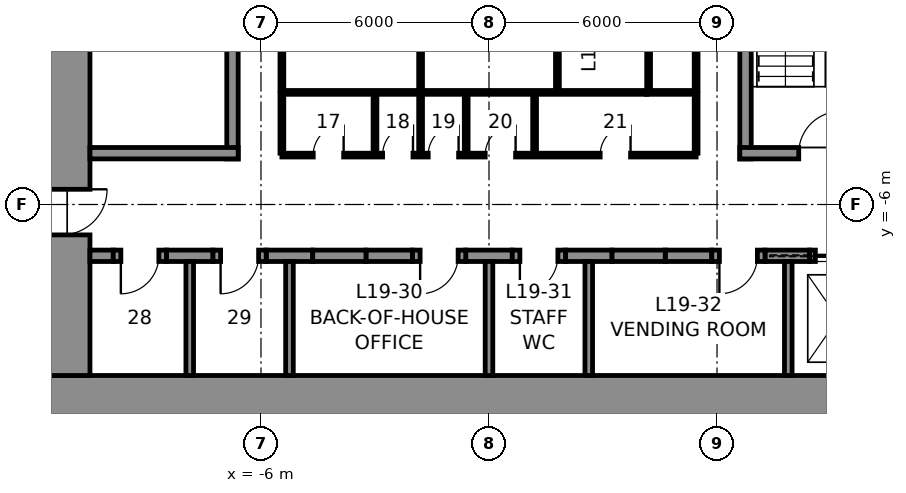
"""IFC4 building model, lengths in metres.
Left out: names, types, materials, properties, quantities, classifications, styles, units other than length and angle.
Written with IfcOpenShell. Run it as: python <this file> out.ifc"""

import sys

from ifc_helpers import new_model, si_unit, direction, frame, frame_2d, origin, place, context, subcontext, project, spatial, rectangle, extrude, element, fill, save


model = new_model("IFC4")
c1 = context("Model", 3, precision=1e-05, world=origin(), true_north=direction((0.0, 1.0)))
c2 = subcontext(c1, "Body", "Model", "MODEL_VIEW")
j1 = project(units=[si_unit("LENGTHUNIT", "METRE"), si_unit("PLANEANGLEUNIT", "RADIAN")], contexts=[c1])
p1 = place(None, origin())
s1 = spatial("IfcSite", under=j1, at=p1, CompositionType="ELEMENT")
p2 = place(p1, origin())
s2 = spatial("IfcBuilding", under=s1, at=p2, CompositionType="ELEMENT")
p3 = place(p2, frame((0.0, 0.0, 99.8)))
s3 = spatial("IfcBuildingStorey", under=s2, at=p3, CompositionType="ELEMENT", Elevation=99.8)
p4 = place(p3, frame((12.0, -11.25, 0.0), z_axis=(0.0, 0.0, 1.0), x_axis=(-1.0, 0.0, 0.0)))
e1 = element("IfcWall", 1, at=p4, inside=s3, PredefinedType="SHEAR", context=c2, shape_type="SweptSolid", body=[
    extrude(rectangle(XDim=24.0, YDim=1.5, at=frame_2d((12.0, 0.0))), origin(), (0.0, 0.0, 1.0), 4.6),
])
p5 = place(p3, frame((-11.25, -10.5, 0.0), z_axis=(0.0, 0.0, 1.0), x_axis=(0.0, 1.0, 0.0)))
e2 = element("IfcWall", 2, at=p5, inside=s3, PredefinedType="SHEAR", context=c2, shape_type="SweptSolid", body=[
    extrude(rectangle(XDim=21.0, YDim=1.5, at=frame_2d((10.5, 0.0))), origin(), (0.0, 0.0, 1.0), 4.6),
])
p6 = place(p5, frame((16.1, 0.0, 0.0)))
e3 = element("IfcOpeningElement", 3, at=p6, cuts=e2, PredefinedType="OPENING", context=c2, shape_type="SweptSolid", body=[
    extrude(rectangle(XDim=1.2, YDim=2.3, at=frame_2d((0.6, 1.15))), frame((0.0, 0.76, 0.0), z_axis=(0.0, -1.0, 0.0), x_axis=(1.0, 0.0, 0.0)), (0.0, 0.0, 1.0), 1.52),
])
p7 = place(p5, frame((3.7, 0.0, 0.0)))
e4 = element("IfcOpeningElement", 4, at=p7, cuts=e2, PredefinedType="OPENING", context=c2, shape_type="SweptSolid", body=[
    extrude(rectangle(XDim=1.2, YDim=2.3, at=frame_2d((0.6, 1.15))), frame((0.0, 0.76, 0.0), z_axis=(0.0, -1.0, 0.0), x_axis=(1.0, 0.0, 0.0)), (0.0, 0.0, 1.0), 1.52),
])
p8 = place(p3, frame((-10.5, -7.35, 0.0), z_axis=(0.0, 0.0, 1.0), x_axis=(1.0, 0.0, 0.0)))
e5 = element("IfcWall", 5, at=p8, inside=s3, PredefinedType="SHEAR", context=c2, shape_type="SweptSolid", body=[
    extrude(rectangle(XDim=0.613, YDim=0.3, at=frame_2d((0.306, 0.0))), origin(), (0.0, 0.0, 1.0), 4.6),
])
for number, where, z_axis, x_axis in (
    (6, (-8.488, -7.35, 0.0), (0.0, 0.0, 1.0), (1.0, 0.0, 0.0)),
    (7, (-5.863, -7.35, 0.0), (0.0, 0.0, 1.0), (1.0, 0.0, 0.0)),
    (8, (-3.238, -7.35, 0.0), (0.0, 0.0, 1.0), (1.0, 0.0, 0.0)),
    (9, (-0.613, -7.35, 0.0), (0.0, 0.0, 1.0), (1.0, 0.0, 0.0)),
    (10, (2.012, -7.35, 0.0), (0.0, 0.0, 1.0), (1.0, 0.0, 0.0)),
    (11, (4.637, -7.35, 0.0), (0.0, 0.0, 1.0), (1.0, 0.0, 0.0)),
):
    element("IfcWall", number, at=place(p3, frame(where, z_axis=z_axis, x_axis=x_axis)), inside=s3, PredefinedType="SHEAR", context=c2, shape_type="SweptSolid", body=[
        extrude(rectangle(XDim=1.225, YDim=0.3, at=frame_2d((0.613, 0.0))), origin(), (0.0, 0.0, 1.0), 4.6),
    ])
p9 = place(p3, frame((7.262, -7.35, 0.0), z_axis=(0.0, 0.0, 1.0), x_axis=(1.0, 0.0, 0.0)))
e12 = element("IfcWall", 12, at=p9, inside=s3, PredefinedType="SHEAR", context=c2, shape_type="SweptSolid", body=[
    extrude(rectangle(XDim=1.175, YDim=0.3, at=frame_2d((0.587, 0.0))), origin(), (0.0, 0.0, 1.0), 4.6),
])
p10 = place(p3, frame((-9.887, -7.35, 0.0), z_axis=(0.0, 0.0, 1.0), x_axis=(1.0, 0.0, 0.0)))
e13 = element("IfcWall", 13, at=p10, inside=s3, PredefinedType="PARTITIONING", context=c2, shape_type="SweptSolid", body=[
    extrude(rectangle(XDim=1.4, YDim=0.3, at=frame_2d((0.7, 0.0))), origin(), (0.0, 0.0, 1.0), 4.6),
])
p11 = place(p10, frame((0.2, 0.0, 0.0)))
e14 = element("IfcOpeningElement", 14, at=p11, cuts=e13, PredefinedType="OPENING", context=c2, shape_type="SweptSolid", body=[
    extrude(rectangle(XDim=1.0, YDim=2.3, at=frame_2d((0.5, 1.15))), frame((0.0, 0.16, 0.0), z_axis=(0.0, -1.0, 0.0), x_axis=(1.0, 0.0, 0.0)), (0.0, 0.0, 1.0), 0.32),
])
p12 = place(p3, frame((-7.262, -7.35, 0.0), z_axis=(0.0, 0.0, 1.0), x_axis=(1.0, 0.0, 0.0)))
e15 = element("IfcWall", 15, at=p12, inside=s3, PredefinedType="PARTITIONING", context=c2, shape_type="SweptSolid", body=[
    extrude(rectangle(XDim=1.4, YDim=0.3, at=frame_2d((0.7, 0.0))), origin(), (0.0, 0.0, 1.0), 4.6),
])
p13 = place(p12, frame((0.2, 0.0, 0.0)))
e16 = element("IfcOpeningElement", 16, at=p13, cuts=e15, PredefinedType="OPENING", context=c2, shape_type="SweptSolid", body=[
    extrude(rectangle(XDim=1.0, YDim=2.3, at=frame_2d((0.5, 1.15))), frame((0.0, 0.16, 0.0), z_axis=(0.0, -1.0, 0.0), x_axis=(1.0, 0.0, 0.0)), (0.0, 0.0, 1.0), 0.32),
])
p14 = place(p3, frame((-4.637, -7.35, 0.0), z_axis=(0.0, 0.0, 1.0), x_axis=(1.0, 0.0, 0.0)))
e17 = element("IfcWall", 17, at=p14, inside=s3, PredefinedType="PARTITIONING", context=c2, shape_type="SweptSolid", body=[
    extrude(rectangle(XDim=1.4, YDim=0.3, at=frame_2d((0.7, 0.0))), origin(), (0.0, 0.0, 1.0), 4.6),
])
p15 = place(p3, frame((-2.012, -7.35, 0.0), z_axis=(0.0, 0.0, 1.0), x_axis=(1.0, 0.0, 0.0)))
e18 = element("IfcWall", 18, at=p15, inside=s3, PredefinedType="PARTITIONING", context=c2, shape_type="SweptSolid", body=[
    extrude(rectangle(XDim=1.4, YDim=0.3, at=frame_2d((0.7, 0.0))), origin(), (0.0, 0.0, 1.0), 4.6),
])
p16 = place(p15, frame((0.2, 0.0, 0.0)))
e19 = element("IfcOpeningElement", 19, at=p16, cuts=e18, PredefinedType="OPENING", context=c2, shape_type="SweptSolid", body=[
    extrude(rectangle(XDim=1.0, YDim=2.3, at=frame_2d((0.5, 1.15))), frame((0.0, 0.16, 0.0), z_axis=(0.0, -1.0, 0.0), x_axis=(1.0, 0.0, 0.0)), (0.0, 0.0, 1.0), 0.32),
])
p17 = place(p3, frame((0.613, -7.35, 0.0), z_axis=(0.0, 0.0, 1.0), x_axis=(1.0, 0.0, 0.0)))
e20 = element("IfcWall", 20, at=p17, inside=s3, PredefinedType="PARTITIONING", context=c2, shape_type="SweptSolid", body=[
    extrude(rectangle(XDim=1.4, YDim=0.3, at=frame_2d((0.7, 0.0))), origin(), (0.0, 0.0, 1.0), 4.6),
])
p18 = place(p17, frame((0.2, 0.0, 0.0)))
e21 = element("IfcOpeningElement", 21, at=p18, cuts=e20, PredefinedType="OPENING", context=c2, shape_type="SweptSolid", body=[
    extrude(rectangle(XDim=1.0, YDim=2.3, at=frame_2d((0.5, 1.15))), frame((0.0, 0.16, 0.0), z_axis=(0.0, -1.0, 0.0), x_axis=(1.0, 0.0, 0.0)), (0.0, 0.0, 1.0), 0.32),
])
p19 = place(p3, frame((3.238, -7.35, 0.0), z_axis=(0.0, 0.0, 1.0), x_axis=(1.0, 0.0, 0.0)))
e22 = element("IfcWall", 22, at=p19, inside=s3, PredefinedType="PARTITIONING", context=c2, shape_type="SweptSolid", body=[
    extrude(rectangle(XDim=1.4, YDim=0.3, at=frame_2d((0.7, 0.0))), origin(), (0.0, 0.0, 1.0), 4.6),
])
p20 = place(p3, frame((5.863, -7.35, 0.0), z_axis=(0.0, 0.0, 1.0), x_axis=(1.0, 0.0, 0.0)))
e23 = element("IfcWall", 23, at=p20, inside=s3, PredefinedType="PARTITIONING", context=c2, shape_type="SweptSolid", body=[
    extrude(rectangle(XDim=1.4, YDim=0.3, at=frame_2d((0.7, 0.0))), origin(), (0.0, 0.0, 1.0), 4.6),
])
p21 = place(p20, frame((0.2, 0.0, 0.0)))
e24 = element("IfcOpeningElement", 24, at=p21, cuts=e23, PredefinedType="OPENING", context=c2, shape_type="SweptSolid", body=[
    extrude(rectangle(XDim=1.0, YDim=2.3, at=frame_2d((0.5, 1.15))), frame((0.0, 0.16, 0.0), z_axis=(0.0, -1.0, 0.0), x_axis=(1.0, 0.0, 0.0)), (0.0, 0.0, 1.0), 0.32),
])
p22 = place(p3, frame((8.438, -7.35, 0.0), z_axis=(0.0, 0.0, 1.0), x_axis=(1.0, 0.0, 0.0)))
e25 = element("IfcWall", 25, at=p22, inside=s3, PredefinedType="PARTITIONING", context=c2, shape_type="SweptSolid", body=[
    extrude(rectangle(XDim=1.5, YDim=0.3, at=frame_2d((0.75, 0.0))), origin(), (0.0, 0.0, 1.0), 4.6),
])
p23 = place(p22, frame((0.15, 0.0, 0.0)))
e26 = element("IfcOpeningElement", 26, at=p23, cuts=e25, PredefinedType="OPENING", context=c2, shape_type="SweptSolid", body=[
    extrude(rectangle(XDim=1.2, YDim=2.3, at=frame_2d((0.6, 1.15))), frame((0.0, 0.16, 0.0), z_axis=(0.0, -1.0, 0.0), x_axis=(1.0, 0.0, 0.0)), (0.0, 0.0, 1.0), 0.32),
])
for number, where, z_axis, x_axis in (
    (27, (-7.875, -10.5, 0.0), (0.0, 0.0, 1.0), (0.0, 1.0, 0.0)),
    (28, (-5.25, -10.5, 0.0), (0.0, 0.0, 1.0), (0.0, 1.0, 0.0)),
    (29, (0.0, -10.5, 0.0), (0.0, 0.0, 1.0), (0.0, 1.0, 0.0)),
    (30, (2.625, -10.5, 0.0), (0.0, 0.0, 1.0), (0.0, 1.0, 0.0)),
    (31, (7.875, -10.5, 0.0), (0.0, 0.0, 1.0), (0.0, 1.0, 0.0)),
):
    element("IfcWall", number, at=place(p3, frame(where, z_axis=z_axis, x_axis=x_axis)), inside=s3, PredefinedType="PARTITIONING", context=c2, shape_type="SweptSolid", body=[
        extrude(rectangle(XDim=3.0, YDim=0.2, at=frame_2d((1.5, 0.0))), origin(), (0.0, 0.0, 1.0), 4.6),
    ])
p24 = place(p3, frame((-6.75, -4.8, 0.0), z_axis=(0.0, 0.0, 1.0), x_axis=(0.0, 1.0, 0.0)))
e32 = element("IfcWall", 32, at=p24, inside=s3, PredefinedType="SOLIDWALL", context=c2, shape_type="SweptSolid", body=[
    extrude(rectangle(XDim=9.6, YDim=0.3, at=frame_2d((4.8, 0.0))), origin(), (0.0, 0.0, 1.0), 4.35),
])
p25 = place(p3, frame((-6.6, -4.65, 0.0), z_axis=(0.0, 0.0, 1.0), x_axis=(-1.0, 0.0, 0.0)))
e33 = element("IfcWall", 33, at=p25, inside=s3, PredefinedType="SOLIDWALL", context=c2, shape_type="SweptSolid", body=[
    extrude(rectangle(XDim=3.9, YDim=0.3, at=frame_2d((1.95, 0.0))), origin(), (0.0, 0.0, 1.0), 4.35),
])
p26 = place(p3, frame((6.75, -4.8, 0.0), z_axis=(0.0, 0.0, 1.0), x_axis=(0.0, 1.0, 0.0)))
e34 = element("IfcWall", 34, at=p26, inside=s3, PredefinedType="SOLIDWALL", context=c2, shape_type="SweptSolid", body=[
    extrude(rectangle(XDim=9.6, YDim=0.3, at=frame_2d((4.8, 0.0))), origin(), (0.0, 0.0, 1.0), 4.35),
])
p27 = place(p3, frame((10.5, -4.65, 0.0), z_axis=(0.0, 0.0, 1.0), x_axis=(-1.0, 0.0, 0.0)))
e35 = element("IfcWall", 35, at=p27, inside=s3, PredefinedType="SOLIDWALL", context=c2, shape_type="SweptSolid", body=[
    extrude(rectangle(XDim=3.9, YDim=0.3, at=frame_2d((1.95, 0.0))), origin(), (0.0, 0.0, 1.0), 4.35),
])
p28 = place(p27, frame((1.25, 0.0, 0.0)))
e36 = element("IfcOpeningElement", 36, at=p28, cuts=e35, PredefinedType="OPENING", context=c2, shape_type="SweptSolid", body=[
    extrude(rectangle(XDim=1.1, YDim=2.3, at=frame_2d((0.55, 1.15))), frame((0.0, 0.16, 0.0), z_axis=(0.0, -1.0, 0.0), x_axis=(1.0, 0.0, 0.0)), (0.0, 0.0, 1.0), 0.32),
])
p29 = place(p3, frame((4.15, -3.05, 0.0), z_axis=(0.0, 0.0, 1.0), x_axis=(-1.0, 0.0, 0.0)))
e37 = element("IfcWall", 37, at=p29, inside=s3, PredefinedType="PARTITIONING", context=c2, shape_type="SweptSolid", body=[
    extrude(rectangle(XDim=9.6, YDim=0.1, at=frame_2d((4.8, 0.0))), origin(), (0.0, 0.0, 1.0), 4.35),
])
p30 = place(p3, frame((5.45, -3.05, 0.0), z_axis=(0.0, 0.0, 1.0), x_axis=(-1.0, 0.0, 0.0)))
e38 = element("IfcWall", 38, at=p30, inside=s3, PredefinedType="PARTITIONING", context=c2, shape_type="SweptSolid", body=[
    extrude(rectangle(XDim=1.3, YDim=0.1, at=frame_2d((0.65, 0.0))), origin(), (0.0, 0.0, 1.0), 4.35),
])
for number, where, z_axis, x_axis in (
    (39, (5.45, 3.0, 0.0), (0.0, 0.0, 1.0), (0.0, -1.0, 0.0)),
    (40, (-5.45, -3.0, 0.0), (0.0, 0.0, 1.0), (0.0, 1.0, 0.0)),
    (41, (-1.8, -3.0, 0.0), (0.0, 0.0, 1.0), (0.0, 1.0, 0.0)),
    (42, (1.8, -3.0, 0.0), (0.0, 0.0, 1.0), (0.0, 1.0, 0.0)),
    (43, (4.2, -3.0, 0.0), (0.0, 0.0, 1.0), (0.0, 1.0, 0.0)),
):
    element("IfcWall", number, at=place(p3, frame(where, z_axis=z_axis, x_axis=x_axis)), inside=s3, PredefinedType="PARTITIONING", context=c2, shape_type="SweptSolid", body=[
        extrude(rectangle(XDim=6.0, YDim=0.1, at=frame_2d((3.0, 0.0))), origin(), (0.0, 0.0, 1.0), 4.35),
    ])
p31 = place(p3, frame((5.45, -4.7, 0.0), z_axis=(0.0, 0.0, 1.0), x_axis=(-1.0, 0.0, 0.0)))
e44 = element("IfcWall", 44, at=p31, inside=s3, PredefinedType="PARTITIONING", context=c2, shape_type="SweptSolid", body=[
    extrude(rectangle(XDim=10.9, YDim=0.1, at=frame_2d((5.45, 0.0))), origin(), (0.0, 0.0, 1.0), 4.35),
])
p32 = place(p31, frame((9.275, 0.0, 0.0)))
e45 = element("IfcOpeningElement", 45, at=p32, cuts=e44, PredefinedType="OPENING", context=c2, shape_type="SweptSolid", body=[
    extrude(rectangle(XDim=0.8, YDim=2.3, at=frame_2d((0.4, 1.15))), frame((0.0, 0.06, 0.0), z_axis=(0.0, -1.0, 0.0), x_axis=(1.0, 0.0, 0.0)), (0.0, 0.0, 1.0), 0.12),
])
p33 = place(p31, frame((7.45, 0.0, 0.0)))
e46 = element("IfcOpeningElement", 46, at=p33, cuts=e44, PredefinedType="OPENING", context=c2, shape_type="SweptSolid", body=[
    extrude(rectangle(XDim=0.8, YDim=2.3, at=frame_2d((0.4, 1.15))), frame((0.0, 0.06, 0.0), z_axis=(0.0, -1.0, 0.0), x_axis=(1.0, 0.0, 0.0)), (0.0, 0.0, 1.0), 0.12),
])
p34 = place(p31, frame((6.25, 0.0, 0.0)))
e47 = element("IfcOpeningElement", 47, at=p34, cuts=e44, PredefinedType="OPENING", context=c2, shape_type="SweptSolid", body=[
    extrude(rectangle(XDim=0.8, YDim=2.3, at=frame_2d((0.4, 1.15))), frame((0.0, 0.06, 0.0), z_axis=(0.0, -1.0, 0.0), x_axis=(1.0, 0.0, 0.0)), (0.0, 0.0, 1.0), 0.12),
])
p35 = place(p31, frame((4.75, 0.0, 0.0)))
e48 = element("IfcOpeningElement", 48, at=p35, cuts=e44, PredefinedType="OPENING", context=c2, shape_type="SweptSolid", body=[
    extrude(rectangle(XDim=0.8, YDim=2.3, at=frame_2d((0.4, 1.15))), frame((0.0, 0.06, 0.0), z_axis=(0.0, -1.0, 0.0), x_axis=(1.0, 0.0, 0.0)), (0.0, 0.0, 1.0), 0.12),
])
p36 = place(p31, frame((1.725, 0.0, 0.0)))
e49 = element("IfcOpeningElement", 49, at=p36, cuts=e44, PredefinedType="OPENING", context=c2, shape_type="SweptSolid", body=[
    extrude(rectangle(XDim=0.8, YDim=2.3, at=frame_2d((0.4, 1.15))), frame((0.0, 0.06, 0.0), z_axis=(0.0, -1.0, 0.0), x_axis=(1.0, 0.0, 0.0)), (0.0, 0.0, 1.0), 0.12),
])
for number, where, z_axis, x_axis in (
    (50, (-5.45, -3.1, 0.0), (0.0, 0.0, 1.0), (0.0, -1.0, 0.0)),
    (51, (5.45, -3.1, 0.0), (0.0, 0.0, 1.0), (0.0, -1.0, 0.0)),
    (52, (-3.0, -3.1, 0.0), (0.0, 0.0, 1.0), (0.0, -1.0, 0.0)),
    (53, (-1.8, -3.1, 0.0), (0.0, 0.0, 1.0), (0.0, -1.0, 0.0)),
    (54, (-0.6, -3.1, 0.0), (0.0, 0.0, 1.0), (0.0, -1.0, 0.0)),
    (55, (1.2, -3.1, 0.0), (0.0, 0.0, 1.0), (0.0, -1.0, 0.0)),
):
    element("IfcWall", number, at=place(p3, frame(where, z_axis=z_axis, x_axis=x_axis)), inside=s3, PredefinedType="PARTITIONING", context=c2, shape_type="SweptSolid", body=[
        extrude(rectangle(XDim=1.55, YDim=0.1, at=frame_2d((0.775, 0.0))), origin(), (0.0, 0.0, 1.0), 4.35),
    ])
p37 = place(p28, frame((1.1, 0.0, 0.0), z_axis=(0.0, 0.0, 1.0), x_axis=(-1.0, 0.0, 0.0)))
e56 = element("IfcDoor", 56, at=p37, inside=s3, OperationType="SINGLE_SWING_RIGHT", PredefinedType="DOOR", context=c2, shape_type="SweptSolid", body=[
    extrude(rectangle(XDim=1.1, YDim=2.3, at=frame_2d((0.55, 1.15))), frame((0.0, 0.025, 0.0), z_axis=(0.0, -1.0, 0.0), x_axis=(1.0, 0.0, 0.0)), (0.0, 0.0, 1.0), 0.05),
])
fill(e36, e56)
p38 = place(p32, frame((0.8, 0.0, 0.0), z_axis=(0.0, 0.0, 1.0), x_axis=(-1.0, 0.0, 0.0)))
e57 = element("IfcDoor", 57, at=p38, inside=s3, OperationType="SINGLE_SWING_RIGHT", PredefinedType="DOOR", context=c2, shape_type="SweptSolid", body=[
    extrude(rectangle(XDim=0.8, YDim=2.3, at=frame_2d((0.4, 1.15))), frame((0.0, 0.025, 0.0), z_axis=(0.0, -1.0, 0.0), x_axis=(1.0, 0.0, 0.0)), (0.0, 0.0, 1.0), 0.05),
])
fill(e45, e57)
p39 = place(p33, frame((0.8, 0.0, 0.0), z_axis=(0.0, 0.0, 1.0), x_axis=(-1.0, 0.0, 0.0)))
e58 = element("IfcDoor", 58, at=p39, inside=s3, OperationType="SINGLE_SWING_RIGHT", PredefinedType="DOOR", context=c2, shape_type="SweptSolid", body=[
    extrude(rectangle(XDim=0.8, YDim=2.3, at=frame_2d((0.4, 1.15))), frame((0.0, 0.025, 0.0), z_axis=(0.0, -1.0, 0.0), x_axis=(1.0, 0.0, 0.0)), (0.0, 0.0, 1.0), 0.05),
])
fill(e46, e58)
p40 = place(p34, frame((0.8, 0.0, 0.0), z_axis=(0.0, 0.0, 1.0), x_axis=(-1.0, 0.0, 0.0)))
e59 = element("IfcDoor", 59, at=p40, inside=s3, OperationType="SINGLE_SWING_RIGHT", PredefinedType="DOOR", context=c2, shape_type="SweptSolid", body=[
    extrude(rectangle(XDim=0.8, YDim=2.3, at=frame_2d((0.4, 1.15))), frame((0.0, 0.025, 0.0), z_axis=(0.0, -1.0, 0.0), x_axis=(1.0, 0.0, 0.0)), (0.0, 0.0, 1.0), 0.05),
])
fill(e47, e59)
p41 = place(p35, frame((0.8, 0.0, 0.0), z_axis=(0.0, 0.0, 1.0), x_axis=(-1.0, 0.0, 0.0)))
e60 = element("IfcDoor", 60, at=p41, inside=s3, OperationType="SINGLE_SWING_RIGHT", PredefinedType="DOOR", context=c2, shape_type="SweptSolid", body=[
    extrude(rectangle(XDim=0.8, YDim=2.3, at=frame_2d((0.4, 1.15))), frame((0.0, 0.025, 0.0), z_axis=(0.0, -1.0, 0.0), x_axis=(1.0, 0.0, 0.0)), (0.0, 0.0, 1.0), 0.05),
])
fill(e48, e60)
p42 = place(p36, frame((0.8, 0.0, 0.0), z_axis=(0.0, 0.0, 1.0), x_axis=(-1.0, 0.0, 0.0)))
e61 = element("IfcDoor", 61, at=p42, inside=s3, OperationType="SINGLE_SWING_RIGHT", PredefinedType="DOOR", context=c2, shape_type="SweptSolid", body=[
    extrude(rectangle(XDim=0.8, YDim=2.3, at=frame_2d((0.4, 1.15))), frame((0.0, 0.025, 0.0), z_axis=(0.0, -1.0, 0.0), x_axis=(1.0, 0.0, 0.0)), (0.0, 0.0, 1.0), 0.05),
])
fill(e49, e61)
p43 = place(p11, frame((1.0, 0.0, 0.0), z_axis=(0.0, 0.0, 1.0), x_axis=(-1.0, 0.0, 0.0)))
e62 = element("IfcDoor", 62, at=p43, inside=s3, OperationType="SINGLE_SWING_RIGHT", PredefinedType="DOOR", context=c2, shape_type="SweptSolid", body=[
    extrude(rectangle(XDim=1.0, YDim=2.3, at=frame_2d((0.5, 1.15))), frame((0.0, 0.025, 0.0), z_axis=(0.0, -1.0, 0.0), x_axis=(1.0, 0.0, 0.0)), (0.0, 0.0, 1.0), 0.05),
])
fill(e14, e62)
p44 = place(p13, frame((1.0, 0.0, 0.0), z_axis=(0.0, 0.0, 1.0), x_axis=(-1.0, 0.0, 0.0)))
e63 = element("IfcDoor", 63, at=p44, inside=s3, OperationType="SINGLE_SWING_RIGHT", PredefinedType="DOOR", context=c2, shape_type="SweptSolid", body=[
    extrude(rectangle(XDim=1.0, YDim=2.3, at=frame_2d((0.5, 1.15))), frame((0.0, 0.025, 0.0), z_axis=(0.0, -1.0, 0.0), x_axis=(1.0, 0.0, 0.0)), (0.0, 0.0, 1.0), 0.05),
])
fill(e16, e63)
p45 = place(p16, frame((1.0, 0.0, 0.0), z_axis=(0.0, 0.0, 1.0), x_axis=(-1.0, 0.0, 0.0)))
e64 = element("IfcDoor", 64, at=p45, inside=s3, OperationType="SINGLE_SWING_RIGHT", PredefinedType="DOOR", context=c2, shape_type="SweptSolid", body=[
    extrude(rectangle(XDim=1.0, YDim=2.3, at=frame_2d((0.5, 1.15))), frame((0.0, 0.025, 0.0), z_axis=(0.0, -1.0, 0.0), x_axis=(1.0, 0.0, 0.0)), (0.0, 0.0, 1.0), 0.05),
])
fill(e19, e64)
p46 = place(p18, frame((1.0, 0.0, 0.0), z_axis=(0.0, 0.0, 1.0), x_axis=(-1.0, 0.0, 0.0)))
e65 = element("IfcDoor", 65, at=p46, inside=s3, OperationType="SINGLE_SWING_RIGHT", PredefinedType="DOOR", context=c2, shape_type="SweptSolid", body=[
    extrude(rectangle(XDim=1.0, YDim=2.3, at=frame_2d((0.5, 1.15))), frame((0.0, 0.025, 0.0), z_axis=(0.0, -1.0, 0.0), x_axis=(1.0, 0.0, 0.0)), (0.0, 0.0, 1.0), 0.05),
])
fill(e21, e65)
p47 = place(p21, frame((1.0, 0.0, 0.0), z_axis=(0.0, 0.0, 1.0), x_axis=(-1.0, 0.0, 0.0)))
e66 = element("IfcDoor", 66, at=p47, inside=s3, OperationType="SINGLE_SWING_RIGHT", PredefinedType="DOOR", context=c2, shape_type="SweptSolid", body=[
    extrude(rectangle(XDim=1.0, YDim=2.3, at=frame_2d((0.5, 1.15))), frame((0.0, 0.025, 0.0), z_axis=(0.0, -1.0, 0.0), x_axis=(1.0, 0.0, 0.0)), (0.0, 0.0, 1.0), 0.05),
])
fill(e24, e66)
p48 = place(p7, frame((1.2, 0.0, 0.0), z_axis=(0.0, 0.0, 1.0), x_axis=(-1.0, 0.0, 0.0)))
e67 = element("IfcDoor", 67, at=p48, inside=s3, OperationType="SINGLE_SWING_LEFT", PredefinedType="DOOR", context=c2, shape_type="SweptSolid", body=[
    extrude(rectangle(XDim=1.2, YDim=2.3, at=frame_2d((0.6, 1.15))), frame((0.0, 0.025, 0.0), z_axis=(0.0, -1.0, 0.0), x_axis=(1.0, 0.0, 0.0)), (0.0, 0.0, 1.0), 0.05),
])
fill(e4, e67)
p49 = place(p23, origin())
e68 = element("IfcDoor", 68, at=p49, inside=s3, OperationType="SLIDING_TO_LEFT", PredefinedType="DOOR", context=c2, shape_type="SweptSolid", body=[
    extrude(rectangle(XDim=1.2, YDim=2.3, at=frame_2d((0.6, 1.15))), frame((0.0, 0.025, 0.0), z_axis=(0.0, -1.0, 0.0), x_axis=(1.0, 0.0, 0.0)), (0.0, 0.0, 1.0), 0.05),
])
fill(e26, e68)
save(model, sys.argv[1])
